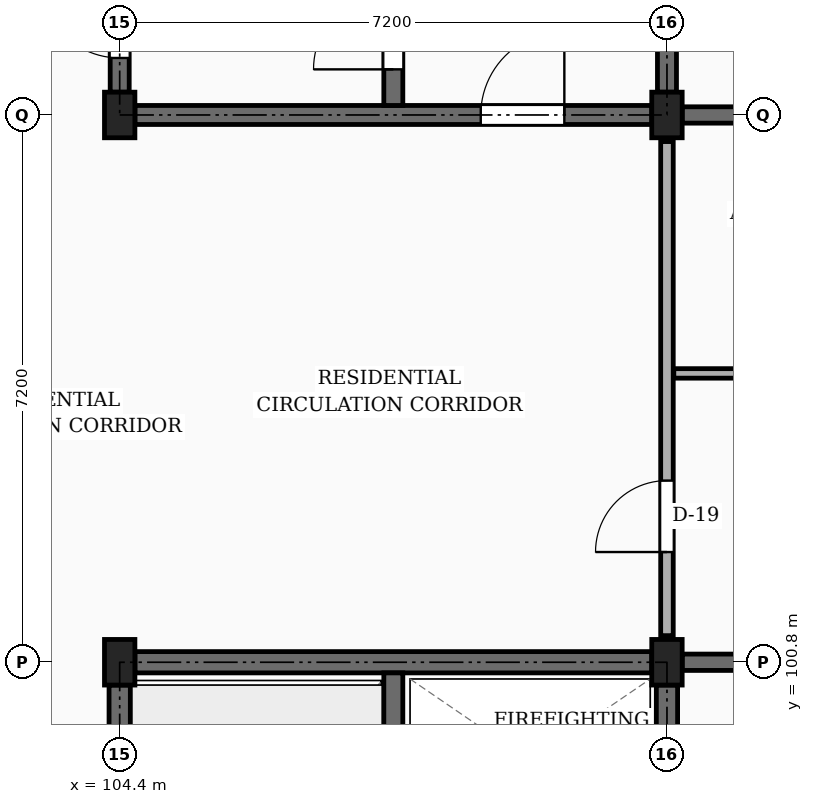
"""IFC4 building model, lengths in metres.
Left out: names, types, materials, properties, quantities, classifications, styles, units other than length and angle.
Written with IfcOpenShell. Run it as: python <this file> out.ifc"""

import sys

from ifc_helpers import new_model, si_unit, direction, frame, frame_2d, origin, origin_2d, place, context, subcontext, project, spatial, rectangle, extrude, element, fill, save


model = new_model("IFC4")
c1 = context("Model", 3, precision=1e-05, world=origin(), true_north=direction((0.0, 1.0)))
c2 = subcontext(c1, "Body", "Model", "MODEL_VIEW")
j1 = project(units=[si_unit("LENGTHUNIT", "METRE"), si_unit("PLANEANGLEUNIT", "RADIAN")], contexts=[c1])
p1 = place(None, origin())
s1 = spatial("IfcSite", under=j1, at=p1, CompositionType="ELEMENT")
p2 = place(p1, origin())
s2 = spatial("IfcBuilding", under=s1, at=p2, CompositionType="ELEMENT")
p3 = place(p2, frame((0.0, 0.0, 29.7)))
s3 = spatial("IfcBuildingStorey", under=s2, at=p3, CompositionType="ELEMENT", Elevation=29.7)
for number, where, z_axis, x_axis in (
    (1, (104.4, 100.8, 0.0), (0.0, 0.0, 1.0), (1.0, 0.0, 0.0)),
    (2, (104.4, 108.0, 0.0), (0.0, 0.0, 1.0), (1.0, 0.0, 0.0)),
    (3, (111.6, 100.8, 0.0), (0.0, 0.0, 1.0), (1.0, 0.0, 0.0)),
    (4, (111.6, 108.0, 0.0), (0.0, 0.0, 1.0), (1.0, 0.0, 0.0)),
):
    element("IfcColumn", number, at=place(p3, frame(where, z_axis=z_axis, x_axis=x_axis)), inside=s3, PredefinedType="COLUMN", context=c2, shape_type="SweptSolid", body=[
        extrude(rectangle(XDim=0.4, YDim=0.6, at=origin_2d()), origin(), (0.0, 0.0, 1.0), 3.15),
    ])
p4 = place(p3, frame((111.8, 100.8, 0.0), z_axis=(0.0, 0.0, 1.0), x_axis=(1.0, 0.0, 0.0)))
e5 = element("IfcWall", 5, at=p4, inside=s3, PredefinedType="SOLIDWALL", context=c2, shape_type="SweptSolid", body=[
    extrude(rectangle(XDim=6.75, YDim=0.215, at=frame_2d((3.375, 0.0))), origin(), (0.0, 0.0, 1.0), 2.19),
])
p5 = place(p3, frame((111.8, 108.0, 0.0), z_axis=(0.0, 0.0, 1.0), x_axis=(1.0, 0.0, 0.0)))
e6 = element("IfcWall", 6, at=p5, inside=s3, PredefinedType="SOLIDWALL", context=c2, shape_type="SweptSolid", body=[
    extrude(rectangle(XDim=6.75, YDim=0.215, at=frame_2d((3.375, 0.0))), origin(), (0.0, 0.0, 1.0), 2.19),
])
p6 = place(p5, frame((4.35, 0.0, 0.0)))
e7 = element("IfcOpeningElement", 7, at=p6, cuts=e6, PredefinedType="OPENING", context=c2, shape_type="SweptSolid", body=[
    extrude(rectangle(XDim=0.98, YDim=2.12, at=frame_2d((0.49, 1.06))), frame((0.0, 0.118, 0.0), z_axis=(0.0, -1.0, 0.0), x_axis=(1.0, 0.0, 0.0)), (0.0, 0.0, 1.0), 0.235),
])
p7 = place(p3, frame((104.4, 93.9, 0.0), z_axis=(0.0, 0.0, 1.0), x_axis=(0.0, 1.0, 0.0)))
e8 = element("IfcWall", 8, at=p7, inside=s3, PredefinedType="SHEAR", context=c2, shape_type="SweptSolid", body=[
    extrude(rectangle(XDim=6.6, YDim=0.28, at=frame_2d((3.3, 0.0))), origin(), (0.0, 0.0, 1.0), 2.89),
])
p8 = place(p7, frame((0.45, 0.0, 0.0)))
e9 = element("IfcOpeningElement", 9, at=p8, cuts=e8, PredefinedType="OPENING", context=c2, shape_type="SweptSolid", body=[
    extrude(rectangle(XDim=1.05, YDim=2.15, at=frame_2d((0.525, 1.075))), frame((0.0, 0.15, 0.0), z_axis=(0.0, -1.0, 0.0), x_axis=(1.0, 0.0, 0.0)), (0.0, 0.0, 1.0), 0.3),
])
p9 = place(p3, frame((104.6, 100.8, 0.0), z_axis=(0.0, 0.0, 1.0), x_axis=(1.0, 0.0, 0.0)))
e10 = element("IfcWall", 10, at=p9, inside=s3, PredefinedType="SHEAR", context=c2, shape_type="SweptSolid", body=[
    extrude(rectangle(XDim=6.8, YDim=0.28, at=frame_2d((3.4, 0.0))), origin(), (0.0, 0.0, 1.0), 2.89),
])
p10 = place(p3, frame((111.6, 93.9, 0.0), z_axis=(0.0, 0.0, 1.0), x_axis=(0.0, 1.0, 0.0)))
e11 = element("IfcWall", 11, at=p10, inside=s3, PredefinedType="SHEAR", context=c2, shape_type="SweptSolid", body=[
    extrude(rectangle(XDim=6.6, YDim=0.28, at=frame_2d((3.3, 0.0))), origin(), (0.0, 0.0, 1.0), 2.89),
])
p11 = place(p3, frame((108.0, 93.74, 0.0), z_axis=(0.0, 0.0, 1.0), x_axis=(0.0, 1.0, 0.0)))
e12 = element("IfcWall", 12, at=p11, inside=s3, PredefinedType="SHEAR", context=c2, shape_type="SweptSolid", body=[
    extrude(rectangle(XDim=6.92, YDim=0.25, at=frame_2d((3.46, 0.0))), origin(), (0.0, 0.0, 1.0), 2.89),
])
p12 = place(p11, frame((0.46, 0.0, 0.0)))
e13 = element("IfcOpeningElement", 13, at=p12, cuts=e12, PredefinedType="OPENING", context=c2, shape_type="SweptSolid", body=[
    extrude(rectangle(XDim=1.05, YDim=2.15, at=frame_2d((0.525, 1.075))), frame((0.0, 0.135, 0.0), z_axis=(0.0, -1.0, 0.0), x_axis=(1.0, 0.0, 0.0)), (0.0, 0.0, 1.0), 0.27),
])
p13 = place(p3, frame((104.4, 108.3, 0.0), z_axis=(0.0, 0.0, 1.0), x_axis=(0.0, 1.0, 0.0)))
e14 = element("IfcWall", 14, at=p13, inside=s3, PredefinedType="SHEAR", context=c2, shape_type="SweptSolid", body=[
    extrude(rectangle(XDim=6.6, YDim=0.25, at=frame_2d((3.3, 0.0))), origin(), (0.0, 0.0, 1.0), 2.89),
])
p14 = place(p13, frame((0.45, 0.0, 0.0)))
e15 = element("IfcOpeningElement", 15, at=p14, cuts=e14, PredefinedType="OPENING", context=c2, shape_type="SweptSolid", body=[
    extrude(rectangle(XDim=1.05, YDim=2.15, at=frame_2d((0.525, 1.075))), frame((0.0, 0.135, 0.0), z_axis=(0.0, -1.0, 0.0), x_axis=(1.0, 0.0, 0.0)), (0.0, 0.0, 1.0), 0.27),
])
p15 = place(p3, frame((111.6, 108.3, 0.0), z_axis=(0.0, 0.0, 1.0), x_axis=(0.0, 1.0, 0.0)))
e16 = element("IfcWall", 16, at=p15, inside=s3, PredefinedType="SHEAR", context=c2, shape_type="SweptSolid", body=[
    extrude(rectangle(XDim=6.6, YDim=0.25, at=frame_2d((3.3, 0.0))), origin(), (0.0, 0.0, 1.0), 2.89),
])
p16 = place(p3, frame((104.6, 108.0, 0.0), z_axis=(0.0, 0.0, 1.0), x_axis=(1.0, 0.0, 0.0)))
e17 = element("IfcWall", 17, at=p16, inside=s3, PredefinedType="SHEAR", context=c2, shape_type="SweptSolid", body=[
    extrude(rectangle(XDim=6.8, YDim=0.25, at=frame_2d((3.4, 0.0))), origin(), (0.0, 0.0, 1.0), 2.89),
])
p17 = place(p16, frame((4.55, 0.0, 0.0)))
e18 = element("IfcOpeningElement", 18, at=p17, cuts=e17, PredefinedType="OPENING", context=c2, shape_type="SweptSolid", body=[
    extrude(rectangle(XDim=1.1, YDim=2.15, at=frame_2d((0.55, 1.075))), frame((0.0, 0.135, 0.0), z_axis=(0.0, -1.0, 0.0), x_axis=(1.0, 0.0, 0.0)), (0.0, 0.0, 1.0), 0.27),
])
p18 = place(p3, frame((108.0, 108.125, 0.0), z_axis=(0.0, 0.0, 1.0), x_axis=(0.0, 1.0, 0.0)))
e19 = element("IfcWall", 19, at=p18, inside=s3, PredefinedType="SHEAR", context=c2, shape_type="SweptSolid", body=[
    extrude(rectangle(XDim=6.95, YDim=0.25, at=frame_2d((3.475, 0.0))), origin(), (0.0, 0.0, 1.0), 2.89),
])
p19 = place(p18, frame((0.475, 0.0, 0.0)))
e20 = element("IfcOpeningElement", 20, at=p19, cuts=e19, PredefinedType="OPENING", context=c2, shape_type="SweptSolid", body=[
    extrude(rectangle(XDim=1.05, YDim=2.15, at=frame_2d((0.525, 1.075))), frame((0.0, 0.135, 0.0), z_axis=(0.0, -1.0, 0.0), x_axis=(1.0, 0.0, 0.0)), (0.0, 0.0, 1.0), 0.27),
])
p20 = place(p3, frame((111.6, 101.15, 0.0), z_axis=(0.0, 0.0, 1.0), x_axis=(0.0, 1.0, 0.0)))
e21 = element("IfcWall", 21, at=p20, inside=s3, PredefinedType="PARTITIONING", context=c2, shape_type="SweptSolid", body=[
    extrude(rectangle(XDim=6.5, YDim=0.165, at=frame_2d((3.25, 0.0))), origin(), (0.0, 0.0, 1.0), 2.325),
])
p21 = place(p20, frame((1.1, 0.0, 0.0)))
e22 = element("IfcOpeningElement", 22, at=p21, cuts=e21, PredefinedType="OPENING", context=c2, shape_type="SweptSolid", body=[
    extrude(rectangle(XDim=0.94, YDim=2.12, at=frame_2d((0.47, 1.06))), frame((0.0, 0.093, 0.0), z_axis=(0.0, -1.0, 0.0), x_axis=(1.0, 0.0, 0.0)), (0.0, 0.0, 1.0), 0.185),
])
p22 = place(p3, frame((111.69, 104.6, 0.0), z_axis=(0.0, 0.0, 1.0), x_axis=(1.0, 0.0, 0.0)))
e23 = element("IfcWall", 23, at=p22, inside=s3, PredefinedType="PARTITIONING", context=c2, shape_type="SweptSolid", body=[
    extrude(rectangle(XDim=6.935, YDim=0.125, at=frame_2d((3.468, 0.0))), origin(), (0.0, 0.0, 1.0), 2.325),
])
p23 = place(p22, frame((1.1, 0.0, 0.0)))
e24 = element("IfcOpeningElement", 24, at=p23, cuts=e23, PredefinedType="OPENING", context=c2, shape_type="SweptSolid", body=[
    extrude(rectangle(XDim=0.87, YDim=2.05, at=frame_2d((0.435, 1.025))), frame((0.0, 0.073, 0.0), z_axis=(0.0, -1.0, 0.0), x_axis=(1.0, 0.0, 0.0)), (0.0, 0.0, 1.0), 0.145),
])
p24 = place(p22, frame((4.5, 0.0, 0.0)))
e25 = element("IfcOpeningElement", 25, at=p24, cuts=e23, PredefinedType="OPENING", context=c2, shape_type="SweptSolid", body=[
    extrude(rectangle(XDim=0.92, YDim=2.1, at=frame_2d((0.46, 1.05))), frame((0.0, 0.073, 0.0), z_axis=(0.0, -1.0, 0.0), x_axis=(1.0, 0.0, 0.0)), (0.0, 0.0, 1.0), 0.145),
])
p25 = place(p14, origin())
e26 = element("IfcDoor", 26, at=p25, inside=s3, OperationType="SINGLE_SWING_RIGHT", PredefinedType="DOOR", context=c2, shape_type="SweptSolid", body=[
    extrude(rectangle(XDim=1.05, YDim=2.15, at=frame_2d((0.525, 1.075))), frame((0.0, 0.025, 0.0), z_axis=(0.0, -1.0, 0.0), x_axis=(1.0, 0.0, 0.0)), (0.0, 0.0, 1.0), 0.05),
])
fill(e15, e26)
p26 = place(p17, frame((1.1, 0.0, 0.0), z_axis=(0.0, 0.0, 1.0), x_axis=(-1.0, 0.0, 0.0)))
e27 = element("IfcDoor", 27, at=p26, inside=s3, OperationType="SINGLE_SWING_RIGHT", PredefinedType="DOOR", context=c2, shape_type="SweptSolid", body=[
    extrude(rectangle(XDim=1.1, YDim=2.15, at=frame_2d((0.55, 1.075))), frame((0.0, 0.025, 0.0), z_axis=(0.0, -1.0, 0.0), x_axis=(1.0, 0.0, 0.0)), (0.0, 0.0, 1.0), 0.05),
])
fill(e18, e27)
p27 = place(p19, origin())
e28 = element("IfcDoor", 28, at=p27, inside=s3, OperationType="SINGLE_SWING_LEFT", PredefinedType="DOOR", context=c2, shape_type="SweptSolid", body=[
    extrude(rectangle(XDim=1.05, YDim=2.15, at=frame_2d((0.525, 1.075))), frame((0.0, 0.025, 0.0), z_axis=(0.0, -1.0, 0.0), x_axis=(1.0, 0.0, 0.0)), (0.0, 0.0, 1.0), 0.05),
])
fill(e20, e28)
p28 = place(p21, origin())
e29 = element("IfcDoor", 29, at=p28, inside=s3, OperationType="SINGLE_SWING_LEFT", PredefinedType="DOOR", context=c2, shape_type="SweptSolid", body=[
    extrude(rectangle(XDim=0.94, YDim=2.12, at=frame_2d((0.47, 1.06))), frame((0.0, 0.025, 0.0), z_axis=(0.0, -1.0, 0.0), x_axis=(1.0, 0.0, 0.0)), (0.0, 0.0, 1.0), 0.05),
])
fill(e22, e29)
save(model, sys.argv[1])
